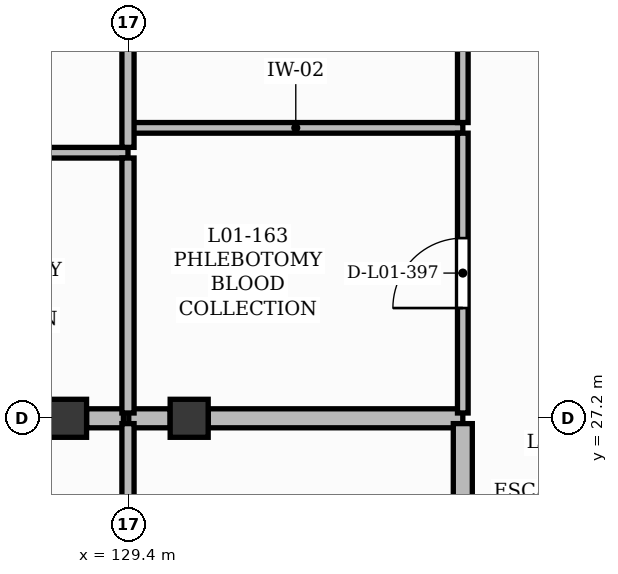
"""IFC4 building model, lengths in metres.
Left out: names, types, materials, properties, quantities, classifications, styles, units other than length and angle.
Written with IfcOpenShell. Run it as: python <this file> out.ifc"""

import sys

from ifc_helpers import new_model, si_unit, direction, frame, frame_2d, origin, origin_2d, place, context, subcontext, project, spatial, rectangle, extrude, element, fill, save


model = new_model("IFC4")
c1 = context("Model", 3, precision=1e-05, world=origin(), true_north=direction((0.0, 1.0)))
c2 = subcontext(c1, "Body", "Model", "MODEL_VIEW")
j1 = project(units=[si_unit("LENGTHUNIT", "METRE"), si_unit("PLANEANGLEUNIT", "RADIAN")], contexts=[c1])
p1 = place(None, origin())
s1 = spatial("IfcSite", under=j1, at=p1, CompositionType="ELEMENT")
p2 = place(p1, origin())
s2 = spatial("IfcBuilding", under=s1, at=p2, CompositionType="ELEMENT")
p3 = place(p2, frame((0.0, 0.0, 4.5)))
s3 = spatial("IfcBuildingStorey", under=s2, at=p3, CompositionType="ELEMENT", Elevation=4.5)
for number, where, z_axis, x_axis in (
    (1, (128.6, 27.2, 0.0), (0.0, 0.0, 1.0), (1.0, 0.0, 0.0)),
    (2, (130.2, 27.2, 0.0), (0.0, 0.0, 1.0), (1.0, 0.0, 0.0)),
):
    element("IfcColumn", number, at=place(p3, frame(where, z_axis=z_axis, x_axis=x_axis)), inside=s3, PredefinedType="COLUMN", context=c2, shape_type="SweptSolid", body=[
        extrude(rectangle(XDim=0.5, YDim=0.5, at=origin_2d()), origin(), (0.0, 0.0, 1.0), 4.22),
    ])
p4 = place(p3, frame((128.85, 27.2, 0.0), z_axis=(0.0, 0.0, 1.0), x_axis=(1.0, 0.0, 0.0)))
e3 = element("IfcWall", 3, at=p4, inside=s3, PredefinedType="SOLIDWALL", context=c2, shape_type="SweptSolid", body=[
    extrude(rectangle(XDim=0.485, YDim=0.25, at=frame_2d((0.242, 0.0))), origin(), (0.0, 0.0, 1.0), 4.18),
])
p5 = place(p3, frame((124.6, 30.694, 0.0), z_axis=(0.0, 0.0, 1.0), x_axis=(1.0, 0.0, 0.0)))
e4 = element("IfcWall", 4, at=p5, inside=s3, PredefinedType="PARTITIONING", context=c2, shape_type="SweptSolid", body=[
    extrude(rectangle(XDim=4.795, YDim=0.14, at=frame_2d((2.397, 0.0))), origin(), (0.0, 0.0, 1.0), 4.18),
])
p6 = place(p3, frame((129.405, 27.2, 0.0), z_axis=(0.0, 0.0, 1.0), x_axis=(1.0, 0.0, 0.0)))
e5 = element("IfcWall", 5, at=p6, inside=s3, PredefinedType="SOLIDWALL", context=c2, shape_type="SweptSolid", body=[
    extrude(rectangle(XDim=0.545, YDim=0.25, at=frame_2d((0.272, 0.0))), origin(), (0.0, 0.0, 1.0), 4.18),
])
p7 = place(p3, frame((130.45, 27.2, 0.0), z_axis=(0.0, 0.0, 1.0), x_axis=(1.0, 0.0, 0.0)))
e6 = element("IfcWall", 6, at=p7, inside=s3, PredefinedType="SOLIDWALL", context=c2, shape_type="SweptSolid", body=[
    extrude(rectangle(XDim=3.35, YDim=0.25, at=frame_2d((1.675, 0.0))), origin(), (0.0, 0.0, 1.0), 3.52),
])
p8 = place(p3, frame((129.405, 31.021, 0.0), z_axis=(0.0, 0.0, 1.0), x_axis=(1.0, 0.0, 0.0)))
e7 = element("IfcWall", 7, at=p8, inside=s3, PredefinedType="PARTITIONING", context=c2, shape_type="SweptSolid", body=[
    extrude(rectangle(XDim=4.395, YDim=0.14, at=frame_2d((2.198, 0.0))), origin(), (0.0, 0.0, 1.0), 4.18),
])
p9 = place(p3, frame((133.8, 21.577, 0.0), z_axis=(0.0, 0.0, 1.0), x_axis=(0.0, 1.0, 0.0)))
e8 = element("IfcWall", 8, at=p9, inside=s3, PredefinedType="SOLIDWALL", context=c2, shape_type="SweptSolid", body=[
    extrude(rectangle(XDim=5.553, YDim=0.25, at=frame_2d((2.776, 0.0))), origin(), (0.0, 0.0, 1.0), 4.18),
])
p10 = place(p9, frame((1.937, 0.0, 0.0)))
e9 = element("IfcOpeningElement", 9, at=p10, cuts=e8, PredefinedType="OPENING", context=c2, shape_type="SweptSolid", body=[
    extrude(rectangle(XDim=1.68, YDim=2.3, at=frame_2d((0.84, 1.15))), frame((0.0, 0.135, 0.0), z_axis=(0.0, -1.0, 0.0), x_axis=(1.0, 0.0, 0.0)), (0.0, 0.0, 1.0), 0.27),
])
p11 = place(p3, frame((133.8, 27.27, 0.0), z_axis=(0.0, 0.0, 1.0), x_axis=(0.0, 1.0, 0.0)))
e10 = element("IfcWall", 10, at=p11, inside=s3, PredefinedType="PARTITIONING", context=c2, shape_type="SweptSolid", body=[
    extrude(rectangle(XDim=3.681, YDim=0.14, at=frame_2d((1.84, 0.0))), origin(), (0.0, 0.0, 1.0), 4.18),
])
p12 = place(p11, frame((1.381, 0.0, 0.0)))
e11 = element("IfcOpeningElement", 11, at=p12, cuts=e10, PredefinedType="OPENING", context=c2, shape_type="SweptSolid", body=[
    extrude(rectangle(XDim=0.92, YDim=2.1, at=frame_2d((0.46, 1.05))), frame((0.0, 0.08, 0.0), z_axis=(0.0, -1.0, 0.0), x_axis=(1.0, 0.0, 0.0)), (0.0, 0.0, 1.0), 0.16),
])
p13 = place(p3, frame((133.8, 31.091, 0.0), z_axis=(0.0, 0.0, 1.0), x_axis=(0.0, 1.0, 0.0)))
e12 = element("IfcWall", 12, at=p13, inside=s3, PredefinedType="PARTITIONING", context=c2, shape_type="SweptSolid", body=[
    extrude(rectangle(XDim=5.639, YDim=0.14, at=frame_2d((2.819, 0.0))), origin(), (0.0, 0.0, 1.0), 4.18),
])
p14 = place(p13, frame((2.24, 0.0, 0.0)))
e13 = element("IfcOpeningElement", 13, at=p14, cuts=e12, PredefinedType="OPENING", context=c2, shape_type="SweptSolid", body=[
    extrude(rectangle(XDim=1.16, YDim=2.1, at=frame_2d((0.58, 1.05))), frame((0.0, 0.08, 0.0), z_axis=(0.0, -1.0, 0.0), x_axis=(1.0, 0.0, 0.0)), (0.0, 0.0, 1.0), 0.16),
])
p15 = place(p3, frame((129.395, 24.441, 0.0), z_axis=(0.0, 0.0, 1.0), x_axis=(0.0, 1.0, 0.0)))
e14 = element("IfcWall", 14, at=p15, inside=s3, PredefinedType="PARTITIONING", context=c2, shape_type="SweptSolid", body=[
    extrude(rectangle(XDim=2.689, YDim=0.16, at=frame_2d((1.345, 0.0))), origin(), (0.0, 0.0, 1.0), 4.18),
])
p16 = place(p3, frame((129.395, 27.27, 0.0), z_axis=(0.0, 0.0, 1.0), x_axis=(0.0, 1.0, 0.0)))
e15 = element("IfcWall", 15, at=p16, inside=s3, PredefinedType="PARTITIONING", context=c2, shape_type="SweptSolid", body=[
    extrude(rectangle(XDim=3.354, YDim=0.16, at=frame_2d((1.677, 0.0))), origin(), (0.0, 0.0, 1.0), 4.18),
])
p17 = place(p3, frame((129.395, 30.764, 0.0), z_axis=(0.0, 0.0, 1.0), x_axis=(0.0, 1.0, 0.0)))
e16 = element("IfcWall", 16, at=p17, inside=s3, PredefinedType="PARTITIONING", context=c2, shape_type="SweptSolid", body=[
    extrude(rectangle(XDim=5.966, YDim=0.16, at=frame_2d((2.983, 0.0))), origin(), (0.0, 0.0, 1.0), 4.18),
])
p18 = place(p12, origin())
e17 = element("IfcDoor", 17, at=p18, inside=s3, OperationType="SINGLE_SWING_LEFT", PredefinedType="DOOR", context=c2, shape_type="SweptSolid", body=[
    extrude(rectangle(XDim=0.92, YDim=2.1, at=frame_2d((0.46, 1.05))), frame((0.0, 0.025, 0.0), z_axis=(0.0, -1.0, 0.0), x_axis=(1.0, 0.0, 0.0)), (0.0, 0.0, 1.0), 0.05),
])
fill(e11, e17)
save(model, sys.argv[1])
